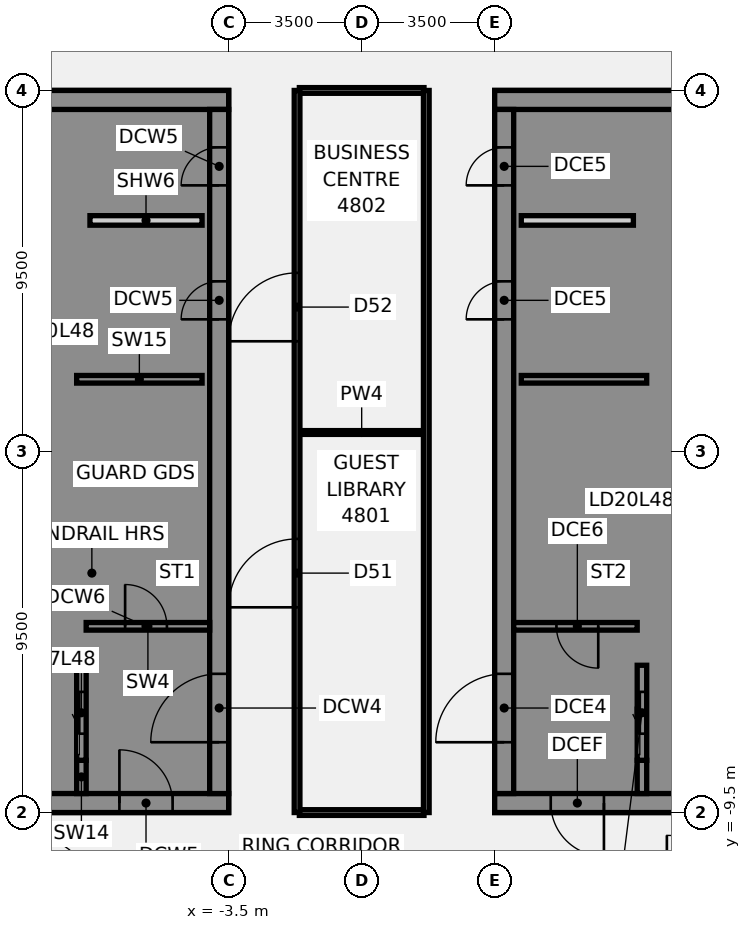
"""IFC4 building model, lengths in metres.
Left out: names, types, materials, properties, quantities, classifications, styles, units other than length and angle.
Written with IfcOpenShell. Run it as: python <this file> out.ifc"""

import sys

from ifc_helpers import new_model, si_unit, direction, frame, frame_2d, origin, place, context, subcontext, project, spatial, polyline, rectangle, outline, extrude, element, fill, save


model = new_model("IFC4")
c1 = context("Model", 3, precision=1e-05, world=origin(), true_north=direction((0.0, 1.0)))
c2 = subcontext(c1, "Body", "Model", "MODEL_VIEW")
j1 = project(units=[si_unit("LENGTHUNIT", "METRE"), si_unit("PLANEANGLEUNIT", "RADIAN")], contexts=[c1])
p1 = place(None, origin())
s1 = spatial("IfcSite", under=j1, at=p1, CompositionType="ELEMENT")
p2 = place(p1, origin())
s2 = spatial("IfcBuilding", under=s1, at=p2, CompositionType="ELEMENT")
p3 = place(p2, frame((0.0, 0.0, 193.3)))
s3 = spatial("IfcBuildingStorey", under=s2, at=p3, CompositionType="ELEMENT", Elevation=193.3)
p4 = place(p3, frame((-1.64, -9.5, 0.0), z_axis=(0.0, 0.0, 1.0), x_axis=(1.0, 0.0, 0.0)))
e1 = element("IfcWall", 1, at=p4, inside=s3, PredefinedType="PARTITIONING", context=c2, shape_type="SweptSolid", body=[
    extrude(rectangle(XDim=3.28, YDim=0.15, at=frame_2d((1.64, 0.0))), origin(), (0.0, 0.0, 1.0), 2.864),
])
p5 = place(p3, frame((-1.64, 0.5, 0.0), z_axis=(0.0, 0.0, 1.0), x_axis=(1.0, 0.0, 0.0)))
e2 = element("IfcWall", 2, at=p5, inside=s3, PredefinedType="PARTITIONING", context=c2, shape_type="SweptSolid", body=[
    extrude(rectangle(XDim=3.28, YDim=0.1, at=frame_2d((1.64, 0.0))), origin(), (0.0, 0.0, 1.0), 2.864),
])
p6 = place(p3, frame((-1.64, 9.5, 0.0), z_axis=(0.0, 0.0, 1.0), x_axis=(1.0, 0.0, 0.0)))
e3 = element("IfcWall", 3, at=p6, inside=s3, PredefinedType="PARTITIONING", context=c2, shape_type="SweptSolid", body=[
    extrude(rectangle(XDim=3.28, YDim=0.15, at=frame_2d((1.64, 0.0))), origin(), (0.0, 0.0, 1.0), 2.864),
])
p7 = place(p3, frame((-1.7, -9.5, 0.0), z_axis=(0.0, 0.0, 1.0), x_axis=(0.0, 1.0, 0.0)))
e4 = element("IfcWall", 4, at=p7, inside=s3, PredefinedType="PARTITIONING", context=c2, shape_type="SweptSolid", body=[
    extrude(rectangle(XDim=19.0, YDim=0.15, at=frame_2d((9.5, 0.0))), origin(), (0.0, 0.0, 1.0), 2.864),
])
p8 = place(p7, frame((5.4, 0.0, 0.0)))
e5 = element("IfcOpeningElement", 5, at=p8, cuts=e4, PredefinedType="OPENING", context=c2, shape_type="SweptSolid", body=[
    extrude(rectangle(XDim=1.8, YDim=2.1, at=frame_2d((0.9, 1.05))), frame((0.0, 0.085, 0.0), z_axis=(0.0, -1.0, 0.0), x_axis=(1.0, 0.0, 0.0)), (0.0, 0.0, 1.0), 0.17),
])
p9 = place(p7, frame((12.4, 0.0, 0.0)))
e6 = element("IfcOpeningElement", 6, at=p9, cuts=e4, PredefinedType="OPENING", context=c2, shape_type="SweptSolid", body=[
    extrude(rectangle(XDim=1.8, YDim=2.1, at=frame_2d((0.9, 1.05))), frame((0.0, 0.085, 0.0), z_axis=(0.0, -1.0, 0.0), x_axis=(1.0, 0.0, 0.0)), (0.0, 0.0, 1.0), 0.17),
])
p10 = place(p3, frame((1.7, -9.5, 0.0), z_axis=(0.0, 0.0, 1.0), x_axis=(0.0, 1.0, 0.0)))
e7 = element("IfcWall", 7, at=p10, inside=s3, PredefinedType="PARTITIONING", context=c2, shape_type="SweptSolid", body=[
    extrude(rectangle(XDim=19.0, YDim=0.15, at=frame_2d((9.5, 0.0))), origin(), (0.0, 0.0, 1.0), 2.864),
])
p11 = place(p3, frame((-16.5, -9.25, 0.0), z_axis=(0.0, 0.0, 1.0), x_axis=(1.0, 0.0, 0.0)))
e8 = element("IfcWall", 8, at=p11, inside=s3, PredefinedType="SHEAR", context=c2, shape_type="SweptSolid", body=[
    extrude(rectangle(XDim=13.0, YDim=0.5, at=frame_2d((6.5, 0.0))), origin(), (0.0, 0.0, 1.0), 3.46),
])
p12 = place(p11, frame((4.15, 0.0, 0.0)))
e9 = element("IfcOpeningElement", 9, at=p12, cuts=e8, PredefinedType="OPENING", context=c2, shape_type="SweptSolid", body=[
    extrude(rectangle(XDim=1.4, YDim=2.1, at=frame_2d((0.7, 1.05))), frame((0.0, 0.26, 0.0), z_axis=(0.0, -1.0, 0.0), x_axis=(1.0, 0.0, 0.0)), (0.0, 0.0, 1.0), 0.52),
])
p13 = place(p11, frame((10.125, 0.0, 0.0)))
e10 = element("IfcOpeningElement", 10, at=p13, cuts=e8, PredefinedType="OPENING", context=c2, shape_type="SweptSolid", body=[
    extrude(rectangle(XDim=1.4, YDim=2.1, at=frame_2d((0.7, 1.05))), frame((0.0, 0.26, 0.0), z_axis=(0.0, -1.0, 0.0), x_axis=(1.0, 0.0, 0.0)), (0.0, 0.0, 1.0), 0.52),
])
p14 = place(p3, frame((-16.5, 9.25, 0.0), z_axis=(0.0, 0.0, 1.0), x_axis=(1.0, 0.0, 0.0)))
e11 = element("IfcWall", 11, at=p14, inside=s3, PredefinedType="SHEAR", context=c2, shape_type="SweptSolid", body=[
    extrude(rectangle(XDim=13.0, YDim=0.5, at=frame_2d((6.5, 0.0))), origin(), (0.0, 0.0, 1.0), 3.46),
])
p15 = place(p3, origin())
e12 = element("IfcWall", 12, at=p15, inside=s3, PredefinedType="SHEAR", context=c2, shape_type="SweptSolid", body=[
    extrude(outline(polyline([(-9.8, -5.375), (-9.8, -5.625), (-7.5, -5.625), (-7.25, -5.625), (-7.25, 9.0), (-7.5, 9.0), (-9.8, 9.0), (-9.8, 8.125), (-7.5, 8.125), (-7.5, 5.625), (-9.8, 5.625), (-9.8, 5.375), (-7.5, 5.375), (-7.5, 2.875), (-9.8, 2.875), (-9.8, 2.625), (-7.5, 2.625), (-7.5, 0.125), (-9.8, 0.125), (-9.8, -0.125), (-7.5, -0.125), (-7.5, -2.625), (-9.8, -2.625), (-9.8, -2.875), (-7.5, -2.875), (-7.5, -5.375), (-9.8, -5.375)])), origin(), (0.0, 0.0, 1.0), 3.46),
])
p16 = place(p3, origin())
e13 = element("IfcWall", 13, at=p16, inside=s3, PredefinedType="SHEAR", context=c2, shape_type="SweptSolid", body=[
    extrude(outline(polyline([(-7.5, -8.125), (-9.55, -8.125), (-9.55, -5.625), (-9.8, -5.625), (-9.8, -8.125), (-9.8, -9.0), (-7.5, -9.0), (-7.5, -8.125)])), origin(), (0.0, 0.0, 1.0), 3.46),
])
p17 = place(p3, frame((-7.375, -9.0, 0.0), z_axis=(0.0, 0.0, 1.0), x_axis=(0.0, 1.0, 0.0)))
e14 = element("IfcWall", 14, at=p17, inside=s3, PredefinedType="SHEAR", context=c2, shape_type="SweptSolid", body=[
    extrude(rectangle(XDim=0.875, YDim=0.25, at=frame_2d((0.438, 0.0))), origin(), (0.0, 0.0, 1.0), 3.46),
])
p18 = place(p3, frame((-7.5, 1.9, 0.0), z_axis=(0.0, 0.0, 1.0), x_axis=(1.0, 0.0, 0.0)))
e15 = element("IfcWall", 15, at=p18, inside=s3, PredefinedType="SHEAR", context=c2, shape_type="SweptSolid", body=[
    extrude(rectangle(XDim=3.3, YDim=0.2, at=frame_2d((1.65, 0.0))), origin(), (0.0, 0.0, 1.0), 3.46),
])
p19 = place(p3, frame((-7.375, -8.125, 0.0), z_axis=(0.0, 0.0, 1.0), x_axis=(0.0, 1.0, 0.0)))
e16 = element("IfcWall", 16, at=p19, inside=s3, PredefinedType="SHEAR", context=c2, shape_type="SweptSolid", body=[
    extrude(rectangle(XDim=2.5, YDim=0.25, at=frame_2d((1.25, 0.0))), origin(), (0.0, 0.0, 1.0), 3.46),
])
p20 = place(p19, frame((0.7, 0.0, 0.0)))
e17 = element("IfcOpeningElement", 17, at=p20, cuts=e16, PredefinedType="OPENING", context=c2, shape_type="SweptSolid", body=[
    extrude(rectangle(XDim=1.1, YDim=2.1, at=frame_2d((0.55, 1.05))), frame((0.0, 0.135, 0.0), z_axis=(0.0, -1.0, 0.0), x_axis=(1.0, 0.0, 0.0)), (0.0, 0.0, 1.0), 0.27),
])
p21 = place(p3, frame((-3.75, -9.0, 0.0), z_axis=(0.0, 0.0, 1.0), x_axis=(0.0, 1.0, 0.0)))
e18 = element("IfcWall", 18, at=p21, inside=s3, PredefinedType="SHEAR", context=c2, shape_type="SweptSolid", body=[
    extrude(rectangle(XDim=18.0, YDim=0.5, at=frame_2d((9.0, 0.0))), origin(), (0.0, 0.0, 1.0), 3.46),
])
p22 = place(p21, frame((1.35, 0.0, 0.0)))
e19 = element("IfcOpeningElement", 19, at=p22, cuts=e18, PredefinedType="OPENING", context=c2, shape_type="SweptSolid", body=[
    extrude(rectangle(XDim=1.8, YDim=2.1, at=frame_2d((0.9, 1.05))), frame((0.0, 0.26, 0.0), z_axis=(0.0, -1.0, 0.0), x_axis=(1.0, 0.0, 0.0)), (0.0, 0.0, 1.0), 0.52),
])
p23 = place(p21, frame((12.478, 0.0, 0.0)))
e20 = element("IfcOpeningElement", 20, at=p23, cuts=e18, PredefinedType="OPENING", context=c2, shape_type="SweptSolid", body=[
    extrude(rectangle(XDim=1.0, YDim=2.1, at=frame_2d((0.5, 1.05))), frame((0.0, 0.26, 0.0), z_axis=(0.0, -1.0, 0.0), x_axis=(1.0, 0.0, 0.0)), (0.0, 0.0, 1.0), 0.52),
])
p24 = place(p21, frame((16.002, 0.0, 0.0)))
e21 = element("IfcOpeningElement", 21, at=p24, cuts=e18, PredefinedType="OPENING", context=c2, shape_type="SweptSolid", body=[
    extrude(rectangle(XDim=1.0, YDim=2.1, at=frame_2d((0.5, 1.05))), frame((0.0, 0.26, 0.0), z_axis=(0.0, -1.0, 0.0), x_axis=(1.0, 0.0, 0.0)), (0.0, 0.0, 1.0), 0.52),
])
p25 = place(p3, frame((-7.15, 6.08, 0.0), z_axis=(0.0, 0.0, 1.0), x_axis=(1.0, 0.0, 0.0)))
e22 = element("IfcWall", 22, at=p25, inside=s3, PredefinedType="PARTITIONING", context=c2, shape_type="SweptSolid", body=[
    extrude(rectangle(XDim=2.95, YDim=0.25, at=frame_2d((1.475, 0.0))), origin(), (0.0, 0.0, 1.0), 3.46),
])
p26 = place(p3, frame((-7.25, -4.6, 0.0), z_axis=(0.0, 0.0, 1.0), x_axis=(1.0, 0.0, 0.0)))
e23 = element("IfcWall", 23, at=p26, inside=s3, PredefinedType="SHEAR", context=c2, shape_type="SweptSolid", body=[
    extrude(rectangle(XDim=3.25, YDim=0.2, at=frame_2d((1.625, 0.0))), origin(), (0.0, 0.0, 1.0), 3.46),
])
p27 = place(p26, frame((1.025, 0.0, 0.0)))
e24 = element("IfcOpeningElement", 24, at=p27, cuts=e23, PredefinedType="OPENING", context=c2, shape_type="SweptSolid", body=[
    extrude(rectangle(XDim=1.1, YDim=2.1, at=frame_2d((0.55, 1.05))), frame((0.0, 0.11, 0.0), z_axis=(0.0, -1.0, 0.0), x_axis=(1.0, 0.0, 0.0)), (0.0, 0.0, 1.0), 0.22),
])
p28 = place(p3, frame((16.5, -9.25, 0.0), z_axis=(0.0, 0.0, 1.0), x_axis=(-1.0, 0.0, 0.0)))
e25 = element("IfcWall", 25, at=p28, inside=s3, PredefinedType="SHEAR", context=c2, shape_type="SweptSolid", body=[
    extrude(rectangle(XDim=13.0, YDim=0.5, at=frame_2d((6.5, 0.0))), origin(), (0.0, 0.0, 1.0), 3.46),
])
p29 = place(p28, frame((4.15, 0.0, 0.0)))
e26 = element("IfcOpeningElement", 26, at=p29, cuts=e25, PredefinedType="OPENING", context=c2, shape_type="SweptSolid", body=[
    extrude(rectangle(XDim=1.4, YDim=2.1, at=frame_2d((0.7, 1.05))), frame((0.0, 0.26, 0.0), z_axis=(0.0, -1.0, 0.0), x_axis=(1.0, 0.0, 0.0)), (0.0, 0.0, 1.0), 0.52),
])
p30 = place(p28, frame((10.125, 0.0, 0.0)))
e27 = element("IfcOpeningElement", 27, at=p30, cuts=e25, PredefinedType="OPENING", context=c2, shape_type="SweptSolid", body=[
    extrude(rectangle(XDim=1.4, YDim=2.1, at=frame_2d((0.7, 1.05))), frame((0.0, 0.26, 0.0), z_axis=(0.0, -1.0, 0.0), x_axis=(1.0, 0.0, 0.0)), (0.0, 0.0, 1.0), 0.52),
])
p31 = place(p3, frame((16.5, 9.25, 0.0), z_axis=(0.0, 0.0, 1.0), x_axis=(-1.0, 0.0, 0.0)))
e28 = element("IfcWall", 28, at=p31, inside=s3, PredefinedType="SHEAR", context=c2, shape_type="SweptSolid", body=[
    extrude(rectangle(XDim=13.0, YDim=0.5, at=frame_2d((6.5, 0.0))), origin(), (0.0, 0.0, 1.0), 3.46),
])
p32 = place(p3, origin())
e29 = element("IfcWall", 29, at=p32, inside=s3, PredefinedType="SHEAR", context=c2, shape_type="SweptSolid", body=[
    extrude(outline(polyline([(9.8, -5.375), (7.5, -5.375), (7.5, -2.875), (9.8, -2.875), (9.8, -2.625), (7.5, -2.625), (7.5, -0.125), (9.8, -0.125), (9.8, 0.125), (7.5, 0.125), (7.5, 2.625), (9.8, 2.625), (9.8, 2.875), (7.5, 2.875), (7.5, 5.375), (9.8, 5.375), (9.8, 5.625), (7.5, 5.625), (7.5, 8.125), (9.8, 8.125), (9.8, 9.0), (7.5, 9.0), (7.25, 9.0), (7.25, -5.625), (7.5, -5.625), (9.8, -5.625), (9.8, -5.375)])), origin(), (0.0, 0.0, 1.0), 3.46),
])
p33 = place(p3, origin())
e30 = element("IfcWall", 30, at=p33, inside=s3, PredefinedType="SHEAR", context=c2, shape_type="SweptSolid", body=[
    extrude(outline(polyline([(7.5, -8.125), (7.5, -9.0), (9.8, -9.0), (9.8, -8.125), (9.8, -5.625), (9.55, -5.625), (9.55, -8.125), (7.5, -8.125)])), origin(), (0.0, 0.0, 1.0), 3.46),
])
p34 = place(p3, frame((7.375, -9.0, 0.0), z_axis=(0.0, 0.0, 1.0), x_axis=(0.0, 1.0, 0.0)))
e31 = element("IfcWall", 31, at=p34, inside=s3, PredefinedType="SHEAR", context=c2, shape_type="SweptSolid", body=[
    extrude(rectangle(XDim=0.875, YDim=0.25, at=frame_2d((0.438, 0.0))), origin(), (0.0, 0.0, 1.0), 3.46),
])
p35 = place(p3, frame((7.5, 1.9, 0.0), z_axis=(0.0, 0.0, 1.0), x_axis=(-1.0, 0.0, 0.0)))
e32 = element("IfcWall", 32, at=p35, inside=s3, PredefinedType="SHEAR", context=c2, shape_type="SweptSolid", body=[
    extrude(rectangle(XDim=3.3, YDim=0.2, at=frame_2d((1.65, 0.0))), origin(), (0.0, 0.0, 1.0), 3.46),
])
p36 = place(p3, frame((7.375, -8.125, 0.0), z_axis=(0.0, 0.0, 1.0), x_axis=(0.0, 1.0, 0.0)))
e33 = element("IfcWall", 33, at=p36, inside=s3, PredefinedType="SHEAR", context=c2, shape_type="SweptSolid", body=[
    extrude(rectangle(XDim=2.5, YDim=0.25, at=frame_2d((1.25, 0.0))), origin(), (0.0, 0.0, 1.0), 3.46),
])
p37 = place(p36, frame((0.7, 0.0, 0.0)))
e34 = element("IfcOpeningElement", 34, at=p37, cuts=e33, PredefinedType="OPENING", context=c2, shape_type="SweptSolid", body=[
    extrude(rectangle(XDim=1.1, YDim=2.1, at=frame_2d((0.55, 1.05))), frame((0.0, 0.135, 0.0), z_axis=(0.0, -1.0, 0.0), x_axis=(1.0, 0.0, 0.0)), (0.0, 0.0, 1.0), 0.27),
])
p38 = place(p3, frame((3.75, -9.0, 0.0), z_axis=(0.0, 0.0, 1.0), x_axis=(0.0, 1.0, 0.0)))
e35 = element("IfcWall", 35, at=p38, inside=s3, PredefinedType="SHEAR", context=c2, shape_type="SweptSolid", body=[
    extrude(rectangle(XDim=18.0, YDim=0.5, at=frame_2d((9.0, 0.0))), origin(), (0.0, 0.0, 1.0), 3.46),
])
p39 = place(p38, frame((1.35, 0.0, 0.0)))
e36 = element("IfcOpeningElement", 36, at=p39, cuts=e35, PredefinedType="OPENING", context=c2, shape_type="SweptSolid", body=[
    extrude(rectangle(XDim=1.8, YDim=2.1, at=frame_2d((0.9, 1.05))), frame((0.0, 0.26, 0.0), z_axis=(0.0, -1.0, 0.0), x_axis=(1.0, 0.0, 0.0)), (0.0, 0.0, 1.0), 0.52),
])
p40 = place(p38, frame((12.478, 0.0, 0.0)))
e37 = element("IfcOpeningElement", 37, at=p40, cuts=e35, PredefinedType="OPENING", context=c2, shape_type="SweptSolid", body=[
    extrude(rectangle(XDim=1.0, YDim=2.1, at=frame_2d((0.5, 1.05))), frame((0.0, 0.26, 0.0), z_axis=(0.0, -1.0, 0.0), x_axis=(1.0, 0.0, 0.0)), (0.0, 0.0, 1.0), 0.52),
])
p41 = place(p38, frame((16.002, 0.0, 0.0)))
e38 = element("IfcOpeningElement", 38, at=p41, cuts=e35, PredefinedType="OPENING", context=c2, shape_type="SweptSolid", body=[
    extrude(rectangle(XDim=1.0, YDim=2.1, at=frame_2d((0.5, 1.05))), frame((0.0, 0.26, 0.0), z_axis=(0.0, -1.0, 0.0), x_axis=(1.0, 0.0, 0.0)), (0.0, 0.0, 1.0), 0.52),
])
p42 = place(p3, frame((7.15, 6.08, 0.0), z_axis=(0.0, 0.0, 1.0), x_axis=(-1.0, 0.0, 0.0)))
e39 = element("IfcWall", 39, at=p42, inside=s3, PredefinedType="PARTITIONING", context=c2, shape_type="SweptSolid", body=[
    extrude(rectangle(XDim=2.95, YDim=0.25, at=frame_2d((1.475, 0.0))), origin(), (0.0, 0.0, 1.0), 3.46),
])
p43 = place(p3, frame((7.25, -4.6, 0.0), z_axis=(0.0, 0.0, 1.0), x_axis=(-1.0, 0.0, 0.0)))
e40 = element("IfcWall", 40, at=p43, inside=s3, PredefinedType="SHEAR", context=c2, shape_type="SweptSolid", body=[
    extrude(rectangle(XDim=3.25, YDim=0.2, at=frame_2d((1.625, 0.0))), origin(), (0.0, 0.0, 1.0), 3.46),
])
p44 = place(p43, frame((1.025, 0.0, 0.0)))
e41 = element("IfcOpeningElement", 41, at=p44, cuts=e40, PredefinedType="OPENING", context=c2, shape_type="SweptSolid", body=[
    extrude(rectangle(XDim=1.1, YDim=2.1, at=frame_2d((0.55, 1.05))), frame((0.0, 0.11, 0.0), z_axis=(0.0, -1.0, 0.0), x_axis=(1.0, 0.0, 0.0)), (0.0, 0.0, 1.0), 0.22),
])
p45 = place(p8, frame((1.8, 0.0, 0.0), z_axis=(0.0, 0.0, 1.0), x_axis=(-1.0, 0.0, 0.0)))
e42 = element("IfcDoor", 42, at=p45, inside=s3, OperationType="DOUBLE_DOOR_SINGLE_SWING", PredefinedType="DOOR", context=c2, shape_type="SweptSolid", body=[
    extrude(rectangle(XDim=1.8, YDim=2.1, at=frame_2d((0.9, 1.05))), frame((0.0, 0.025, 0.0), z_axis=(0.0, -1.0, 0.0), x_axis=(1.0, 0.0, 0.0)), (0.0, 0.0, 1.0), 0.05),
])
fill(e5, e42)
p46 = place(p9, frame((1.8, 0.0, 0.0), z_axis=(0.0, 0.0, 1.0), x_axis=(-1.0, 0.0, 0.0)))
e43 = element("IfcDoor", 43, at=p46, inside=s3, OperationType="DOUBLE_DOOR_SINGLE_SWING", PredefinedType="DOOR", context=c2, shape_type="SweptSolid", body=[
    extrude(rectangle(XDim=1.8, YDim=2.1, at=frame_2d((0.9, 1.05))), frame((0.0, 0.025, 0.0), z_axis=(0.0, -1.0, 0.0), x_axis=(1.0, 0.0, 0.0)), (0.0, 0.0, 1.0), 0.05),
])
fill(e6, e43)
p47 = place(p13, origin())
e44 = element("IfcDoor", 44, at=p47, inside=s3, OperationType="SINGLE_SWING_LEFT", PredefinedType="DOOR", context=c2, shape_type="SweptSolid", body=[
    extrude(rectangle(XDim=1.4, YDim=2.1, at=frame_2d((0.7, 1.05))), frame((0.0, 0.025, 0.0), z_axis=(0.0, -1.0, 0.0), x_axis=(1.0, 0.0, 0.0)), (0.0, 0.0, 1.0), 0.05),
])
fill(e10, e44)
p48 = place(p22, origin())
e45 = element("IfcDoor", 45, at=p48, inside=s3, OperationType="SINGLE_SWING_LEFT", PredefinedType="DOOR", context=c2, shape_type="SweptSolid", body=[
    extrude(rectangle(XDim=1.8, YDim=2.1, at=frame_2d((0.9, 1.05))), frame((0.0, 0.025, 0.0), z_axis=(0.0, -1.0, 0.0), x_axis=(1.0, 0.0, 0.0)), (0.0, 0.0, 1.0), 0.05),
])
fill(e19, e45)
p49 = place(p23, origin())
e46 = element("IfcDoor", 46, at=p49, inside=s3, OperationType="SINGLE_SWING_LEFT", PredefinedType="DOOR", context=c2, shape_type="SweptSolid", body=[
    extrude(rectangle(XDim=1.0, YDim=2.1, at=frame_2d((0.5, 1.05))), frame((0.0, 0.225, 0.0), z_axis=(0.0, -1.0, 0.0), x_axis=(1.0, 0.0, 0.0)), (0.0, 0.0, 1.0), 0.05),
])
fill(e20, e46)
p50 = place(p24, origin())
e47 = element("IfcDoor", 47, at=p50, inside=s3, OperationType="SINGLE_SWING_LEFT", PredefinedType="DOOR", context=c2, shape_type="SweptSolid", body=[
    extrude(rectangle(XDim=1.0, YDim=2.1, at=frame_2d((0.5, 1.05))), frame((0.0, 0.225, 0.0), z_axis=(0.0, -1.0, 0.0), x_axis=(1.0, 0.0, 0.0)), (0.0, 0.0, 1.0), 0.05),
])
fill(e21, e47)
p51 = place(p27, origin())
e48 = element("IfcDoor", 48, at=p51, inside=s3, OperationType="SINGLE_SWING_LEFT", PredefinedType="DOOR", context=c2, shape_type="SweptSolid", body=[
    extrude(rectangle(XDim=1.1, YDim=2.1, at=frame_2d((0.55, 1.05))), frame((0.0, 0.025, 0.0), z_axis=(0.0, -1.0, 0.0), x_axis=(1.0, 0.0, 0.0)), (0.0, 0.0, 1.0), 0.05),
])
fill(e24, e48)
p52 = place(p20, origin())
e49 = element("IfcDoor", 49, at=p52, inside=s3, OperationType="SLIDING_TO_LEFT", PredefinedType="DOOR", context=c2, shape_type="SweptSolid", body=[
    extrude(rectangle(XDim=1.1, YDim=2.1, at=frame_2d((0.55, 1.05))), frame((0.0, 0.025, 0.0), z_axis=(0.0, -1.0, 0.0), x_axis=(1.0, 0.0, 0.0)), (0.0, 0.0, 1.0), 0.05),
])
fill(e17, e49)
p53 = place(p30, origin())
e50 = element("IfcDoor", 50, at=p53, inside=s3, OperationType="SINGLE_SWING_LEFT", PredefinedType="DOOR", context=c2, shape_type="SweptSolid", body=[
    extrude(rectangle(XDim=1.4, YDim=2.1, at=frame_2d((0.7, 1.05))), frame((0.0, 0.025, 0.0), z_axis=(0.0, -1.0, 0.0), x_axis=(1.0, 0.0, 0.0)), (0.0, 0.0, 1.0), 0.05),
])
fill(e27, e50)
p54 = place(p39, origin())
e51 = element("IfcDoor", 51, at=p54, inside=s3, OperationType="SINGLE_SWING_LEFT", PredefinedType="DOOR", context=c2, shape_type="SweptSolid", body=[
    extrude(rectangle(XDim=1.8, YDim=2.1, at=frame_2d((0.9, 1.05))), frame((0.0, 0.025, 0.0), z_axis=(0.0, -1.0, 0.0), x_axis=(1.0, 0.0, 0.0)), (0.0, 0.0, 1.0), 0.05),
])
fill(e36, e51)
p55 = place(p40, origin())
e52 = element("IfcDoor", 52, at=p55, inside=s3, OperationType="SINGLE_SWING_LEFT", PredefinedType="DOOR", context=c2, shape_type="SweptSolid", body=[
    extrude(rectangle(XDim=1.0, YDim=2.1, at=frame_2d((0.5, 1.05))), frame((0.0, -0.175, 0.0), z_axis=(0.0, -1.0, 0.0), x_axis=(1.0, 0.0, 0.0)), (0.0, 0.0, 1.0), 0.05),
])
fill(e37, e52)
p56 = place(p41, origin())
e53 = element("IfcDoor", 53, at=p56, inside=s3, OperationType="SINGLE_SWING_LEFT", PredefinedType="DOOR", context=c2, shape_type="SweptSolid", body=[
    extrude(rectangle(XDim=1.0, YDim=2.1, at=frame_2d((0.5, 1.05))), frame((0.0, -0.175, 0.0), z_axis=(0.0, -1.0, 0.0), x_axis=(1.0, 0.0, 0.0)), (0.0, 0.0, 1.0), 0.05),
])
fill(e38, e53)
p57 = place(p44, origin())
e54 = element("IfcDoor", 54, at=p57, inside=s3, OperationType="SINGLE_SWING_LEFT", PredefinedType="DOOR", context=c2, shape_type="SweptSolid", body=[
    extrude(rectangle(XDim=1.1, YDim=2.1, at=frame_2d((0.55, 1.05))), frame((0.0, 0.025, 0.0), z_axis=(0.0, -1.0, 0.0), x_axis=(1.0, 0.0, 0.0)), (0.0, 0.0, 1.0), 0.05),
])
fill(e41, e54)
p58 = place(p37, origin())
e55 = element("IfcDoor", 55, at=p58, inside=s3, OperationType="SLIDING_TO_LEFT", PredefinedType="DOOR", context=c2, shape_type="SweptSolid", body=[
    extrude(rectangle(XDim=1.1, YDim=2.1, at=frame_2d((0.55, 1.05))), frame((0.0, 0.025, 0.0), z_axis=(0.0, -1.0, 0.0), x_axis=(1.0, 0.0, 0.0)), (0.0, 0.0, 1.0), 0.05),
])
fill(e34, e55)
save(model, sys.argv[1])
